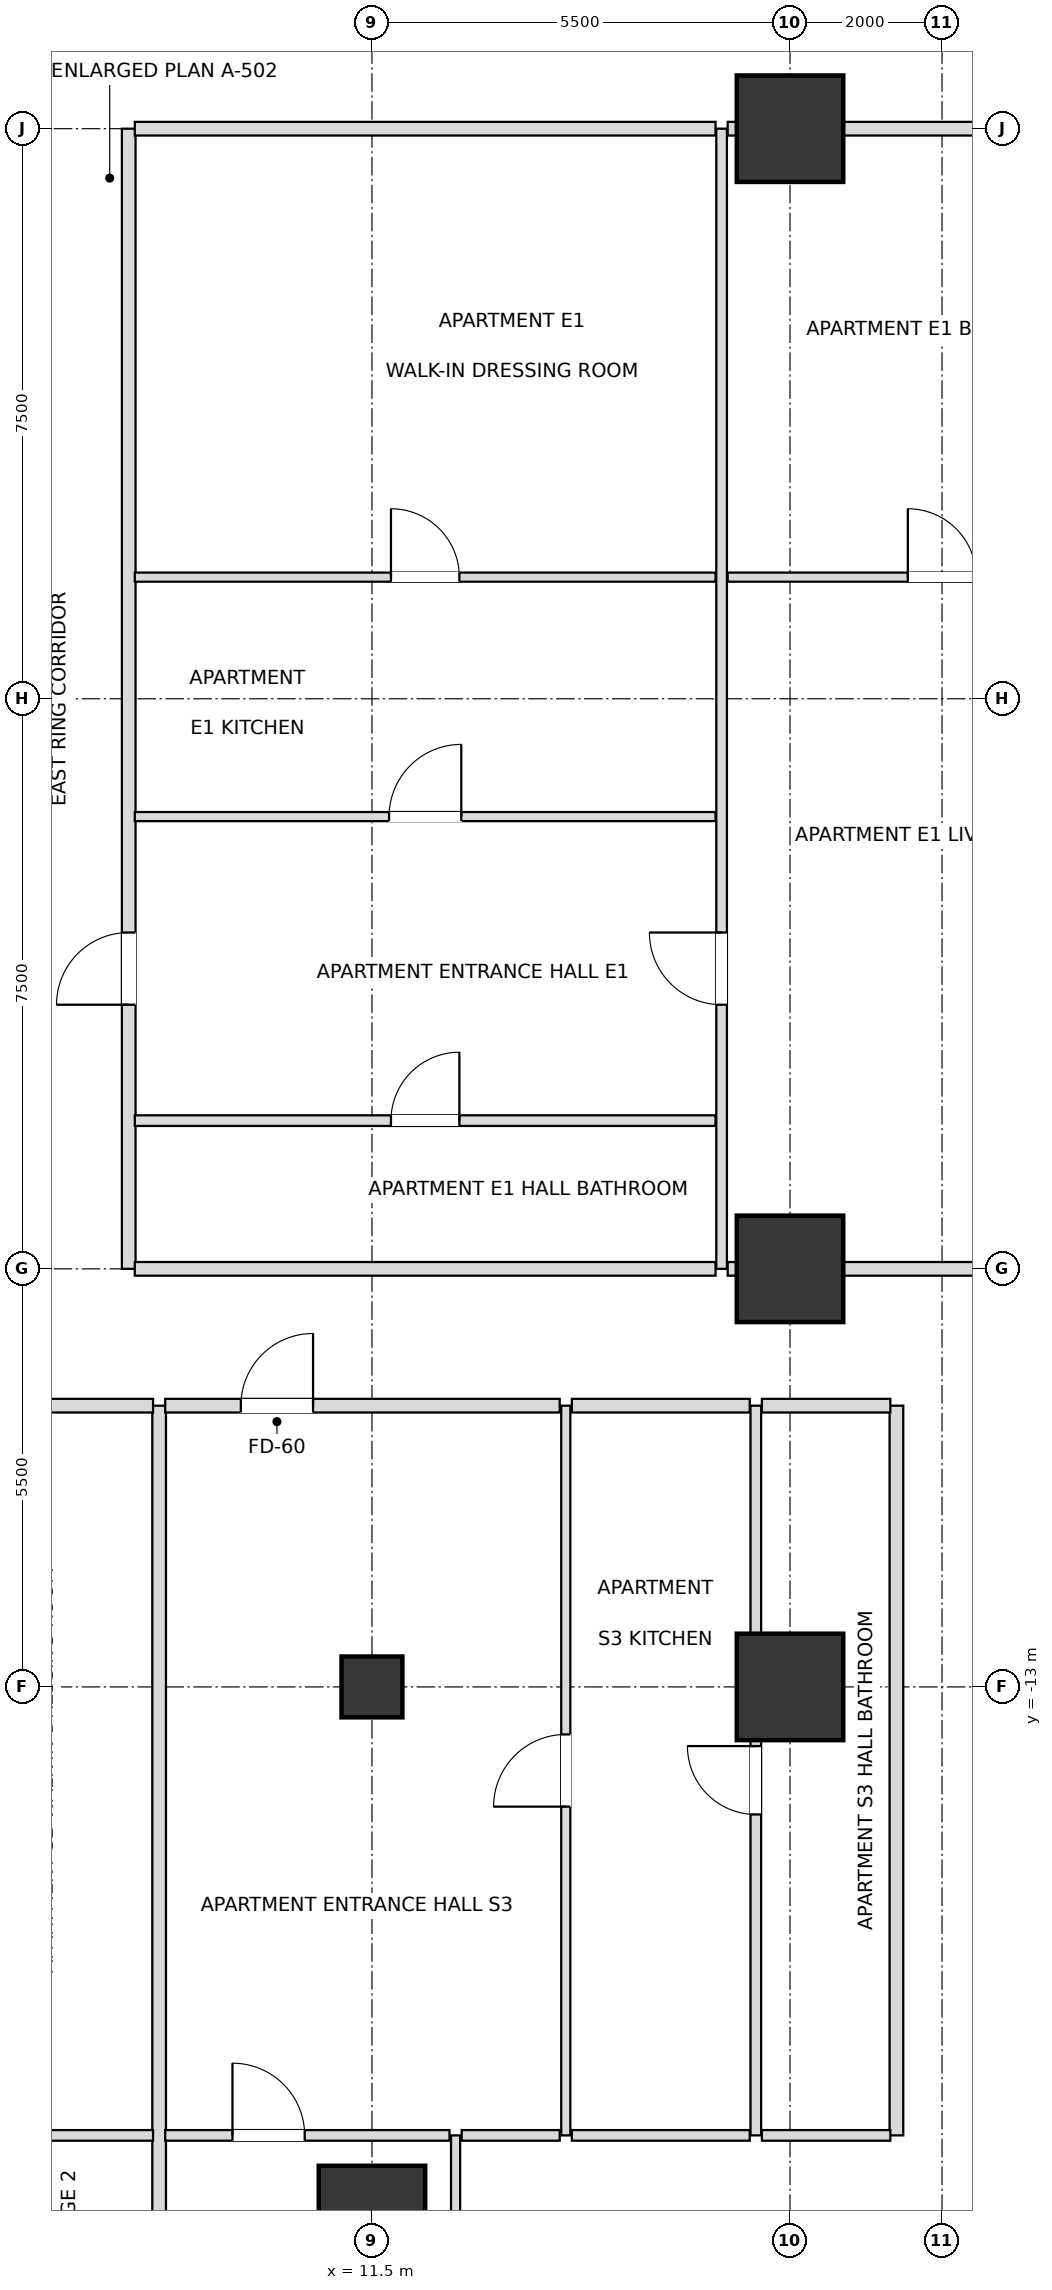
"""IFC4 building model, lengths in metres.
Left out: names, types, materials, properties, quantities, classifications, styles, units other than length and angle.
Written with IfcOpenShell. Run it as: python <this file> out.ifc"""

import sys

from ifc_helpers import new_model, si_unit, direction, frame, frame_2d, origin, origin_2d, place, context, subcontext, project, spatial, rectangle, extrude, element, fill, save


model = new_model("IFC4")
c1 = context("Model", 3, precision=1e-05, world=origin(), true_north=direction((0.0, 1.0)))
c2 = subcontext(c1, "Body", "Model", "MODEL_VIEW")
j1 = project(units=[si_unit("LENGTHUNIT", "METRE"), si_unit("PLANEANGLEUNIT", "RADIAN")], contexts=[c1])
p1 = place(None, origin())
s1 = spatial("IfcSite", under=j1, at=p1, CompositionType="ELEMENT")
p2 = place(p1, origin())
s2 = spatial("IfcBuilding", under=s1, at=p2, CompositionType="ELEMENT")
p3 = place(p2, frame((0.0, 0.0, 43.2)))
s3 = spatial("IfcBuildingStorey", under=s2, at=p3, CompositionType="ELEMENT", Elevation=43.2)
for number, where, z_axis, x_axis in (
    (1, (11.5, -20.0, 0.0), (0.0, 0.0, 1.0), (1.0, 0.0, 0.0)),
    (2, (17.0, -13.0, 0.0), (0.0, 0.0, 1.0), (1.0, 0.0, 0.0)),
    (3, (17.0, -7.5, 0.0), (0.0, 0.0, 1.0), (1.0, 0.0, 0.0)),
    (4, (17.0, 7.5, 0.0), (0.0, 0.0, 1.0), (1.0, 0.0, 0.0)),
):
    element("IfcColumn", number, at=place(p3, frame(where, z_axis=z_axis, x_axis=x_axis)), inside=s3, PredefinedType="USERDEFINED", context=c2, shape_type="SweptSolid", body=[
        extrude(rectangle(XDim=1.4, YDim=1.4, at=origin_2d()), origin(), (0.0, 0.0, 1.0), 3.6),
    ])
p4 = place(p3, frame((11.5, -13.0, 0.0), z_axis=(0.0, 0.0, 1.0), x_axis=(1.0, 0.0, 0.0)))
e5 = element("IfcColumn", 5, at=p4, inside=s3, PredefinedType="COLUMN", context=c2, shape_type="SweptSolid", body=[
    extrude(rectangle(XDim=0.8, YDim=0.8, at=origin_2d()), origin(), (0.0, 0.0, 1.0), 3.6),
])
p5 = place(p3, frame((8.3, -7.5, 0.0), z_axis=(0.0, 0.0, 1.0), x_axis=(0.0, 1.0, 0.0)))
e6 = element("IfcWall", 6, at=p5, inside=s3, PredefinedType="PARTITIONING", context=c2, shape_type="SweptSolid", body=[
    extrude(rectangle(XDim=15.0, YDim=0.18, at=frame_2d((7.5, 0.0))), origin(), (0.0, 0.0, 1.0), 3.38),
])
p6 = place(p5, frame((3.475, 0.0, 0.0)))
e7 = element("IfcOpeningElement", 7, at=p6, cuts=e6, PredefinedType="OPENING", context=c2, shape_type="SweptSolid", body=[
    extrude(rectangle(XDim=0.95, YDim=2.15, at=frame_2d((0.475, 1.075))), frame((0.0, 0.1, 0.0), z_axis=(0.0, -1.0, 0.0), x_axis=(1.0, 0.0, 0.0)), (0.0, 0.0, 1.0), 0.2),
])
p7 = place(p3, frame((8.7, -24.9, 0.0), z_axis=(0.0, 0.0, 1.0), x_axis=(0.0, 1.0, 0.0)))
e8 = element("IfcWall", 8, at=p7, inside=s3, PredefinedType="PARTITIONING", context=c2, shape_type="SweptSolid", body=[
    extrude(rectangle(XDim=15.6, YDim=0.18, at=frame_2d((7.8, 0.0))), origin(), (0.0, 0.0, 1.0), 2.816),
])
p8 = place(p3, frame((12.6, -24.9, 0.0), z_axis=(0.0, 0.0, 1.0), x_axis=(0.0, 1.0, 0.0)))
e9 = element("IfcWall", 9, at=p8, inside=s3, PredefinedType="PARTITIONING", context=c2, shape_type="SweptSolid", body=[
    extrude(rectangle(XDim=6.0, YDim=0.12, at=frame_2d((3.0, 0.0))), origin(), (0.0, 0.0, 1.0), 2.736),
])
p9 = place(p8, frame((2.55, 0.0, 0.0)))
e10 = element("IfcOpeningElement", 10, at=p9, cuts=e9, PredefinedType="OPENING", context=c2, shape_type="SweptSolid", body=[
    extrude(rectangle(XDim=0.9, YDim=2.1, at=frame_2d((0.45, 1.05))), frame((0.0, 0.07, 0.0), z_axis=(0.0, -1.0, 0.0), x_axis=(1.0, 0.0, 0.0)), (0.0, 0.0, 1.0), 0.14),
])
p10 = place(p3, frame((14.05, -18.9, 0.0), z_axis=(0.0, 0.0, 1.0), x_axis=(0.0, 1.0, 0.0)))
e11 = element("IfcWall", 11, at=p10, inside=s3, PredefinedType="PARTITIONING", context=c2, shape_type="SweptSolid", body=[
    extrude(rectangle(XDim=9.6, YDim=0.12, at=frame_2d((4.8, 0.0))), origin(), (0.0, 0.0, 1.0), 2.736),
])
p11 = place(p10, frame((4.325, 0.0, 0.0)))
e12 = element("IfcOpeningElement", 12, at=p11, cuts=e11, PredefinedType="OPENING", context=c2, shape_type="SweptSolid", body=[
    extrude(rectangle(XDim=0.95, YDim=2.1, at=frame_2d((0.475, 1.05))), frame((0.0, 0.07, 0.0), z_axis=(0.0, -1.0, 0.0), x_axis=(1.0, 0.0, 0.0)), (0.0, 0.0, 1.0), 0.14),
])
p12 = place(p3, frame((16.1, -7.5, 0.0), z_axis=(0.0, 0.0, 1.0), x_axis=(0.0, 1.0, 0.0)))
e13 = element("IfcWall", 13, at=p12, inside=s3, PredefinedType="PARTITIONING", context=c2, shape_type="SweptSolid", body=[
    extrude(rectangle(XDim=15.0, YDim=0.14, at=frame_2d((7.5, 0.0))), origin(), (0.0, 0.0, 1.0), 3.38),
])
p13 = place(p12, frame((3.475, 0.0, 0.0)))
e14 = element("IfcOpeningElement", 14, at=p13, cuts=e13, PredefinedType="OPENING", context=c2, shape_type="SweptSolid", body=[
    extrude(rectangle(XDim=0.95, YDim=2.1, at=frame_2d((0.475, 1.05))), frame((0.0, 0.08, 0.0), z_axis=(0.0, -1.0, 0.0), x_axis=(1.0, 0.0, 0.0)), (0.0, 0.0, 1.0), 0.16),
])
p14 = place(p3, frame((16.55, -18.9, 0.0), z_axis=(0.0, 0.0, 1.0), x_axis=(0.0, 1.0, 0.0)))
e15 = element("IfcWall", 15, at=p14, inside=s3, PredefinedType="PARTITIONING", context=c2, shape_type="SweptSolid", body=[
    extrude(rectangle(XDim=9.6, YDim=0.14, at=frame_2d((4.8, 0.0))), origin(), (0.0, 0.0, 1.0), 2.736),
])
p15 = place(p14, frame((4.222, 0.0, 0.0)))
e16 = element("IfcOpeningElement", 16, at=p15, cuts=e15, PredefinedType="OPENING", context=c2, shape_type="SweptSolid", body=[
    extrude(rectangle(XDim=0.9, YDim=2.1, at=frame_2d((0.45, 1.05))), frame((0.0, 0.08, 0.0), z_axis=(0.0, -1.0, 0.0), x_axis=(1.0, 0.0, 0.0)), (0.0, 0.0, 1.0), 0.16),
])
p16 = place(p3, frame((18.4, -18.9, 0.0), z_axis=(0.0, 0.0, 1.0), x_axis=(0.0, 1.0, 0.0)))
e17 = element("IfcWall", 17, at=p16, inside=s3, PredefinedType="PARTITIONING", context=c2, shape_type="SweptSolid", body=[
    extrude(rectangle(XDim=9.6, YDim=0.18, at=frame_2d((4.8, 0.0))), origin(), (0.0, 0.0, 1.0), 2.736),
])
p17 = place(p3, frame((5.83, -18.9, 0.0), z_axis=(0.0, 0.0, 1.0), x_axis=(1.0, 0.0, 0.0)))
e18 = element("IfcWall", 18, at=p17, inside=s3, PredefinedType="PARTITIONING", context=c2, shape_type="SweptSolid", body=[
    extrude(rectangle(XDim=2.79, YDim=0.14, at=frame_2d((1.395, 0.0))), origin(), (0.0, 0.0, 1.0), 2.816),
])
p18 = place(p3, frame((8.78, -18.9, 0.0), z_axis=(0.0, 0.0, 1.0), x_axis=(1.0, 0.0, 0.0)))
e19 = element("IfcWall", 19, at=p18, inside=s3, PredefinedType="PARTITIONING", context=c2, shape_type="SweptSolid", body=[
    extrude(rectangle(XDim=3.74, YDim=0.14, at=frame_2d((1.87, 0.0))), origin(), (0.0, 0.0, 1.0), 2.736),
])
p19 = place(p18, frame((0.885, 0.0, 0.0)))
e20 = element("IfcOpeningElement", 20, at=p19, cuts=e19, PredefinedType="OPENING", context=c2, shape_type="SweptSolid", body=[
    extrude(rectangle(XDim=0.95, YDim=2.1, at=frame_2d((0.475, 1.05))), frame((0.0, 0.08, 0.0), z_axis=(0.0, -1.0, 0.0), x_axis=(1.0, 0.0, 0.0)), (0.0, 0.0, 1.0), 0.16),
])
p20 = place(p3, frame((12.68, -18.9, 0.0), z_axis=(0.0, 0.0, 1.0), x_axis=(1.0, 0.0, 0.0)))
e21 = element("IfcWall", 21, at=p20, inside=s3, PredefinedType="PARTITIONING", context=c2, shape_type="SweptSolid", body=[
    extrude(rectangle(XDim=1.29, YDim=0.14, at=frame_2d((0.645, 0.0))), origin(), (0.0, 0.0, 1.0), 2.736),
])
p21 = place(p3, frame((14.13, -18.9, 0.0), z_axis=(0.0, 0.0, 1.0), x_axis=(1.0, 0.0, 0.0)))
e22 = element("IfcWall", 22, at=p21, inside=s3, PredefinedType="PARTITIONING", context=c2, shape_type="SweptSolid", body=[
    extrude(rectangle(XDim=2.34, YDim=0.14, at=frame_2d((1.17, 0.0))), origin(), (0.0, 0.0, 1.0), 2.736),
])
p22 = place(p3, frame((16.63, -18.9, 0.0), z_axis=(0.0, 0.0, 1.0), x_axis=(1.0, 0.0, 0.0)))
e23 = element("IfcWall", 23, at=p22, inside=s3, PredefinedType="PARTITIONING", context=c2, shape_type="SweptSolid", body=[
    extrude(rectangle(XDim=1.69, YDim=0.14, at=frame_2d((0.845, 0.0))), origin(), (0.0, 0.0, 1.0), 2.736),
])
p23 = place(p3, frame((5.83, -9.3, 0.0), z_axis=(0.0, 0.0, 1.0), x_axis=(1.0, 0.0, 0.0)))
e24 = element("IfcWall", 24, at=p23, inside=s3, PredefinedType="PARTITIONING", context=c2, shape_type="SweptSolid", body=[
    extrude(rectangle(XDim=2.79, YDim=0.18, at=frame_2d((1.395, 0.0))), origin(), (0.0, 0.0, 1.0), 2.816),
])
p24 = place(p3, frame((8.78, -9.3, 0.0), z_axis=(0.0, 0.0, 1.0), x_axis=(1.0, 0.0, 0.0)))
e25 = element("IfcWall", 25, at=p24, inside=s3, PredefinedType="PARTITIONING", context=c2, shape_type="SweptSolid", body=[
    extrude(rectangle(XDim=5.19, YDim=0.18, at=frame_2d((2.595, 0.0))), origin(), (0.0, 0.0, 1.0), 3.38),
])
p25 = place(p24, frame((0.995, 0.0, 0.0)))
e26 = element("IfcOpeningElement", 26, at=p25, cuts=e25, PredefinedType="OPENING", context=c2, shape_type="SweptSolid", body=[
    extrude(rectangle(XDim=0.95, YDim=2.15, at=frame_2d((0.475, 1.075))), frame((0.0, 0.1, 0.0), z_axis=(0.0, -1.0, 0.0), x_axis=(1.0, 0.0, 0.0)), (0.0, 0.0, 1.0), 0.2),
])
p26 = place(p3, frame((14.13, -9.3, 0.0), z_axis=(0.0, 0.0, 1.0), x_axis=(1.0, 0.0, 0.0)))
e27 = element("IfcWall", 27, at=p26, inside=s3, PredefinedType="PARTITIONING", context=c2, shape_type="SweptSolid", body=[
    extrude(rectangle(XDim=2.34, YDim=0.18, at=frame_2d((1.17, 0.0))), origin(), (0.0, 0.0, 1.0), 3.38),
])
p27 = place(p3, frame((16.63, -9.3, 0.0), z_axis=(0.0, 0.0, 1.0), x_axis=(1.0, 0.0, 0.0)))
e28 = element("IfcWall", 28, at=p27, inside=s3, PredefinedType="PARTITIONING", context=c2, shape_type="SweptSolid", body=[
    extrude(rectangle(XDim=1.69, YDim=0.18, at=frame_2d((0.845, 0.0))), origin(), (0.0, 0.0, 1.0), 2.816),
])
p28 = place(p3, frame((8.38, -7.5, 0.0), z_axis=(0.0, 0.0, 1.0), x_axis=(1.0, 0.0, 0.0)))
e29 = element("IfcWall", 29, at=p28, inside=s3, PredefinedType="PARTITIONING", context=c2, shape_type="SweptSolid", body=[
    extrude(rectangle(XDim=7.64, YDim=0.18, at=frame_2d((3.82, 0.0))), origin(), (0.0, 0.0, 1.0), 2.816),
])
p29 = place(p3, frame((16.18, -7.5, 0.0), z_axis=(0.0, 0.0, 1.0), x_axis=(1.0, 0.0, 0.0)))
e30 = element("IfcWall", 30, at=p29, inside=s3, PredefinedType="PARTITIONING", context=c2, shape_type="SweptSolid", body=[
    extrude(rectangle(XDim=5.72, YDim=0.18, at=frame_2d((2.86, 0.0))), origin(), (0.0, 0.0, 1.0), 2.816),
])
p30 = place(p3, frame((8.38, -5.55, 0.0), z_axis=(0.0, 0.0, 1.0), x_axis=(1.0, 0.0, 0.0)))
e31 = element("IfcWall", 31, at=p30, inside=s3, PredefinedType="PARTITIONING", context=c2, shape_type="SweptSolid", body=[
    extrude(rectangle(XDim=7.64, YDim=0.14, at=frame_2d((3.82, 0.0))), origin(), (0.0, 0.0, 1.0), 2.948),
])
p31 = place(p30, frame((3.37, 0.0, 0.0)))
e32 = element("IfcOpeningElement", 32, at=p31, cuts=e31, PredefinedType="OPENING", context=c2, shape_type="SweptSolid", body=[
    extrude(rectangle(XDim=0.9, YDim=2.1, at=frame_2d((0.45, 1.05))), frame((0.0, 0.08, 0.0), z_axis=(0.0, -1.0, 0.0), x_axis=(1.0, 0.0, 0.0)), (0.0, 0.0, 1.0), 0.16),
])
p32 = place(p3, frame((8.38, -1.55, 0.0), z_axis=(0.0, 0.0, 1.0), x_axis=(1.0, 0.0, 0.0)))
e33 = element("IfcWall", 33, at=p32, inside=s3, PredefinedType="PARTITIONING", context=c2, shape_type="SweptSolid", body=[
    extrude(rectangle(XDim=7.64, YDim=0.12, at=frame_2d((3.82, 0.0))), origin(), (0.0, 0.0, 1.0), 2.948),
])
p33 = place(p32, frame((3.345, 0.0, 0.0)))
e34 = element("IfcOpeningElement", 34, at=p33, cuts=e33, PredefinedType="OPENING", context=c2, shape_type="SweptSolid", body=[
    extrude(rectangle(XDim=0.95, YDim=2.1, at=frame_2d((0.475, 1.05))), frame((0.0, 0.07, 0.0), z_axis=(0.0, -1.0, 0.0), x_axis=(1.0, 0.0, 0.0)), (0.0, 0.0, 1.0), 0.14),
])
p34 = place(p3, frame((8.38, 1.6, 0.0), z_axis=(0.0, 0.0, 1.0), x_axis=(1.0, 0.0, 0.0)))
e35 = element("IfcWall", 35, at=p34, inside=s3, PredefinedType="PARTITIONING", context=c2, shape_type="SweptSolid", body=[
    extrude(rectangle(XDim=7.64, YDim=0.12, at=frame_2d((3.82, 0.0))), origin(), (0.0, 0.0, 1.0), 2.948),
])
p35 = place(p34, frame((3.37, 0.0, 0.0)))
e36 = element("IfcOpeningElement", 36, at=p35, cuts=e35, PredefinedType="OPENING", context=c2, shape_type="SweptSolid", body=[
    extrude(rectangle(XDim=0.9, YDim=2.1, at=frame_2d((0.45, 1.05))), frame((0.0, 0.07, 0.0), z_axis=(0.0, -1.0, 0.0), x_axis=(1.0, 0.0, 0.0)), (0.0, 0.0, 1.0), 0.14),
])
p36 = place(p3, frame((16.18, 1.6, 0.0), z_axis=(0.0, 0.0, 1.0), x_axis=(1.0, 0.0, 0.0)))
e37 = element("IfcWall", 37, at=p36, inside=s3, PredefinedType="PARTITIONING", context=c2, shape_type="SweptSolid", body=[
    extrude(rectangle(XDim=5.64, YDim=0.12, at=frame_2d((2.82, 0.0))), origin(), (0.0, 0.0, 1.0), 2.816),
])
p37 = place(p36, frame((2.37, 0.0, 0.0)))
e38 = element("IfcOpeningElement", 38, at=p37, cuts=e37, PredefinedType="OPENING", context=c2, shape_type="SweptSolid", body=[
    extrude(rectangle(XDim=0.9, YDim=2.1, at=frame_2d((0.45, 1.05))), frame((0.0, 0.07, 0.0), z_axis=(0.0, -1.0, 0.0), x_axis=(1.0, 0.0, 0.0)), (0.0, 0.0, 1.0), 0.14),
])
p38 = place(p3, frame((8.38, 7.5, 0.0), z_axis=(0.0, 0.0, 1.0), x_axis=(1.0, 0.0, 0.0)))
e39 = element("IfcWall", 39, at=p38, inside=s3, PredefinedType="PARTITIONING", context=c2, shape_type="SweptSolid", body=[
    extrude(rectangle(XDim=7.64, YDim=0.18, at=frame_2d((3.82, 0.0))), origin(), (0.0, 0.0, 1.0), 2.816),
])
p39 = place(p3, frame((16.18, 7.5, 0.0), z_axis=(0.0, 0.0, 1.0), x_axis=(1.0, 0.0, 0.0)))
e40 = element("IfcWall", 40, at=p39, inside=s3, PredefinedType="PARTITIONING", context=c2, shape_type="SweptSolid", body=[
    extrude(rectangle(XDim=5.72, YDim=0.18, at=frame_2d((2.86, 0.0))), origin(), (0.0, 0.0, 1.0), 2.816),
])
p40 = place(p25, origin())
e41 = element("IfcDoor", 41, at=p40, inside=s3, OperationType="SINGLE_SWING_RIGHT", PredefinedType="DOOR", context=c2, shape_type="SweptSolid", body=[
    extrude(rectangle(XDim=0.95, YDim=2.15, at=frame_2d((0.475, 1.075))), frame((0.0, 0.025, 0.0), z_axis=(0.0, -1.0, 0.0), x_axis=(1.0, 0.0, 0.0)), (0.0, 0.0, 1.0), 0.05),
])
fill(e26, e41)
p41 = place(p11, origin())
e42 = element("IfcDoor", 42, at=p41, inside=s3, OperationType="SINGLE_SWING_LEFT", PredefinedType="DOOR", context=c2, shape_type="SweptSolid", body=[
    extrude(rectangle(XDim=0.95, YDim=2.1, at=frame_2d((0.475, 1.05))), frame((0.0, 0.025, 0.0), z_axis=(0.0, -1.0, 0.0), x_axis=(1.0, 0.0, 0.0)), (0.0, 0.0, 1.0), 0.05),
])
fill(e12, e42)
p42 = place(p15, origin())
e43 = element("IfcDoor", 43, at=p42, inside=s3, OperationType="SINGLE_SWING_RIGHT", PredefinedType="DOOR", context=c2, shape_type="SweptSolid", body=[
    extrude(rectangle(XDim=0.9, YDim=2.1, at=frame_2d((0.45, 1.05))), frame((0.0, 0.025, 0.0), z_axis=(0.0, -1.0, 0.0), x_axis=(1.0, 0.0, 0.0)), (0.0, 0.0, 1.0), 0.05),
])
fill(e16, e43)
p43 = place(p19, origin())
e44 = element("IfcDoor", 44, at=p43, inside=s3, OperationType="SINGLE_SWING_LEFT", PredefinedType="DOOR", context=c2, shape_type="SweptSolid", body=[
    extrude(rectangle(XDim=0.95, YDim=2.1, at=frame_2d((0.475, 1.05))), frame((0.0, 0.025, 0.0), z_axis=(0.0, -1.0, 0.0), x_axis=(1.0, 0.0, 0.0)), (0.0, 0.0, 1.0), 0.05),
])
fill(e20, e44)
p44 = place(p31, origin())
e45 = element("IfcDoor", 45, at=p44, inside=s3, OperationType="SINGLE_SWING_RIGHT", PredefinedType="DOOR", context=c2, shape_type="SweptSolid", body=[
    extrude(rectangle(XDim=0.9, YDim=2.1, at=frame_2d((0.45, 1.05))), frame((0.0, 0.025, 0.0), z_axis=(0.0, -1.0, 0.0), x_axis=(1.0, 0.0, 0.0)), (0.0, 0.0, 1.0), 0.05),
])
fill(e32, e45)
p45 = place(p6, origin())
e46 = element("IfcDoor", 46, at=p45, inside=s3, OperationType="SINGLE_SWING_LEFT", PredefinedType="DOOR", context=c2, shape_type="SweptSolid", body=[
    extrude(rectangle(XDim=0.95, YDim=2.15, at=frame_2d((0.475, 1.075))), frame((0.0, 0.025, 0.0), z_axis=(0.0, -1.0, 0.0), x_axis=(1.0, 0.0, 0.0)), (0.0, 0.0, 1.0), 0.05),
])
fill(e7, e46)
p46 = place(p33, origin())
e47 = element("IfcDoor", 47, at=p46, inside=s3, OperationType="SINGLE_SWING_RIGHT", PredefinedType="DOOR", context=c2, shape_type="SweptSolid", body=[
    extrude(rectangle(XDim=0.95, YDim=2.1, at=frame_2d((0.475, 1.05))), frame((0.0, 0.025, 0.0), z_axis=(0.0, -1.0, 0.0), x_axis=(1.0, 0.0, 0.0)), (0.0, 0.0, 1.0), 0.05),
])
fill(e34, e47)
p47 = place(p35, origin())
e48 = element("IfcDoor", 48, at=p47, inside=s3, OperationType="SINGLE_SWING_LEFT", PredefinedType="DOOR", context=c2, shape_type="SweptSolid", body=[
    extrude(rectangle(XDim=0.9, YDim=2.1, at=frame_2d((0.45, 1.05))), frame((0.0, 0.025, 0.0), z_axis=(0.0, -1.0, 0.0), x_axis=(1.0, 0.0, 0.0)), (0.0, 0.0, 1.0), 0.05),
])
fill(e36, e48)
p48 = place(p13, origin())
e49 = element("IfcDoor", 49, at=p48, inside=s3, OperationType="SINGLE_SWING_RIGHT", PredefinedType="DOOR", context=c2, shape_type="SweptSolid", body=[
    extrude(rectangle(XDim=0.95, YDim=2.1, at=frame_2d((0.475, 1.05))), frame((0.0, 0.025, 0.0), z_axis=(0.0, -1.0, 0.0), x_axis=(1.0, 0.0, 0.0)), (0.0, 0.0, 1.0), 0.05),
])
fill(e14, e49)
p49 = place(p37, origin())
e50 = element("IfcDoor", 50, at=p49, inside=s3, OperationType="SINGLE_SWING_LEFT", PredefinedType="DOOR", context=c2, shape_type="SweptSolid", body=[
    extrude(rectangle(XDim=0.9, YDim=2.1, at=frame_2d((0.45, 1.05))), frame((0.0, 0.025, 0.0), z_axis=(0.0, -1.0, 0.0), x_axis=(1.0, 0.0, 0.0)), (0.0, 0.0, 1.0), 0.05),
])
fill(e38, e50)
save(model, sys.argv[1])
